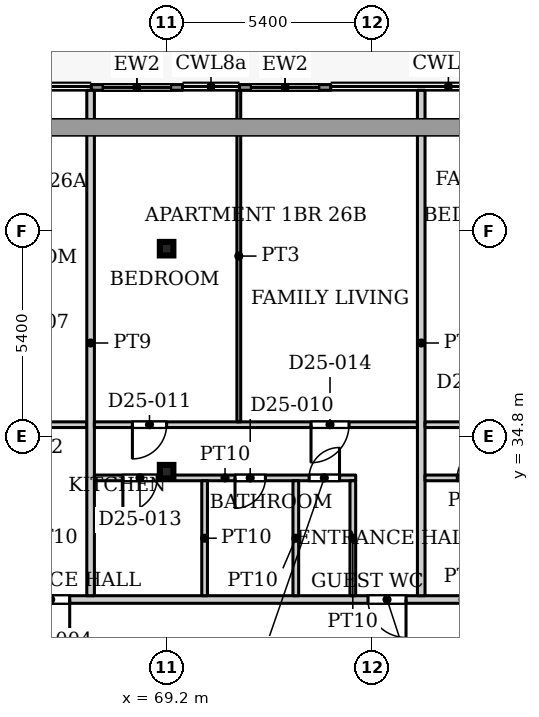
"""IFC4 building model, lengths in metres.
Left out: names, types, materials, properties, quantities, classifications, styles, units other than length and angle.
Written with IfcOpenShell. Run it as: python <this file> out.ifc"""

import sys

from ifc_helpers import new_model, si_unit, direction, frame, frame_2d, origin, origin_2d, place, context, subcontext, project, spatial, rectangle, hollow_rectangle, extrude, source, transform, mapped, element, fill, save


model = new_model("IFC4")
c1 = context("Model", 3, precision=1e-05, world=origin(), true_north=direction((0.0, 1.0)))
c2 = subcontext(c1, "Body", "Model", "MODEL_VIEW")
j1 = project(units=[si_unit("LENGTHUNIT", "METRE"), si_unit("PLANEANGLEUNIT", "RADIAN")], contexts=[c1])
p1 = place(None, origin())
s1 = spatial("IfcSite", under=j1, at=p1, CompositionType="ELEMENT")
p2 = place(p1, origin())
s2 = spatial("IfcBuilding", under=s1, at=p2, CompositionType="ELEMENT")
p3 = place(p2, frame((0.0, 0.0, 113.6)))
s3 = spatial("IfcBuildingStorey", under=s2, at=p3, CompositionType="ELEMENT", Elevation=113.6)
for number, where, z_axis, x_axis in (
    (1, (69.2, 33.863, 0.0), (0.0, 0.0, 1.0), (1.0, 0.0, 0.0)),
    (2, (69.2, 39.732, 0.0), (0.0, 0.0, 1.0), (1.0, 0.0, 0.0)),
):
    element("IfcColumn", number, at=place(p3, frame(where, z_axis=z_axis, x_axis=x_axis)), inside=s3, PredefinedType="COLUMN", context=c2, shape_type="SweptSolid", body=[
        extrude(hollow_rectangle(XDim=0.356, YDim=0.356, WallThickness=0.016, InnerFilletRadius=0.016, OuterFilletRadius=0.032, at=origin_2d()), origin(), (0.0, 0.0, 1.0), 3.9),
    ])
p4 = place(p3, frame((67.218, 43.975, 0.0), z_axis=(0.0, 0.0, 1.0), x_axis=(1.0, 0.0, 0.0)))
e3 = element("IfcWall", 3, at=p4, inside=s3, PredefinedType="SOLIDWALL", context=c2, shape_type="SweptSolid", body=[
    extrude(rectangle(XDim=2.4, YDim=0.15, at=frame_2d((1.2, 0.0))), origin(), (0.0, 0.0, 1.0), 3.75),
])
p5 = place(p4, frame((0.3, 0.0, 0.0)))
e4 = element("IfcOpeningElement", 4, at=p5, cuts=e3, PredefinedType="OPENING", context=c2, shape_type="SweptSolid", body=[
    extrude(rectangle(XDim=1.8, YDim=2.4, at=frame_2d((0.9, 1.2))), frame((0.0, 0.085, 0.0), z_axis=(0.0, -1.0, 0.0), x_axis=(1.0, 0.0, 0.0)), (0.0, 0.0, 1.0), 0.17),
])
p6 = place(p3, frame((71.118, 43.975, 0.0), z_axis=(0.0, 0.0, 1.0), x_axis=(1.0, 0.0, 0.0)))
e5 = element("IfcWall", 5, at=p6, inside=s3, PredefinedType="SOLIDWALL", context=c2, shape_type="SweptSolid", body=[
    extrude(rectangle(XDim=2.4, YDim=0.15, at=frame_2d((1.2, 0.0))), origin(), (0.0, 0.0, 1.0), 3.75),
])
p7 = place(p6, frame((0.3, 0.0, 0.0)))
e6 = element("IfcOpeningElement", 6, at=p7, cuts=e5, PredefinedType="OPENING", context=c2, shape_type="SweptSolid", body=[
    extrude(rectangle(XDim=1.8, YDim=2.4, at=frame_2d((0.9, 1.2))), frame((0.0, 0.085, 0.0), z_axis=(0.0, -1.0, 0.0), x_axis=(1.0, 0.0, 0.0)), (0.0, 0.0, 1.0), 0.17),
])
p8 = place(p3, frame((55.9, 30.5, 0.0), z_axis=(0.0, 0.0, 1.0), x_axis=(1.0, 0.0, 0.0)))
e7 = element("IfcWall", 7, at=p8, inside=s3, PredefinedType="PARTITIONING", context=c2, shape_type="SweptSolid", body=[
    extrude(rectangle(XDim=42.2, YDim=0.2, at=frame_2d((21.1, 0.0))), origin(), (0.0, 0.0, 1.0), 3.6),
])
p9 = place(p8, frame((9.75, 0.0, 0.0)))
e8 = element("IfcOpeningElement", 8, at=p9, cuts=e7, PredefinedType="OPENING", context=c2, shape_type="SweptSolid", body=[
    extrude(rectangle(XDim=1.0, YDim=2.1, at=frame_2d((0.5, 1.05))), frame((0.0, 0.11, 0.0), z_axis=(0.0, -1.0, 0.0), x_axis=(1.0, 0.0, 0.0)), (0.0, 0.0, 1.0), 0.22),
])
p10 = place(p8, frame((18.6, 0.0, 0.0)))
e9 = element("IfcOpeningElement", 9, at=p10, cuts=e7, PredefinedType="OPENING", context=c2, shape_type="SweptSolid", body=[
    extrude(rectangle(XDim=1.0, YDim=2.1, at=frame_2d((0.5, 1.05))), frame((0.0, 0.11, 0.0), z_axis=(0.0, -1.0, 0.0), x_axis=(1.0, 0.0, 0.0)), (0.0, 0.0, 1.0), 0.22),
])
p11 = place(p8, frame((23.4, 0.0, 0.0)))
e10 = element("IfcOpeningElement", 10, at=p11, cuts=e7, PredefinedType="OPENING", context=c2, shape_type="SweptSolid", body=[
    extrude(rectangle(XDim=1.0, YDim=2.1, at=frame_2d((0.5, 1.05))), frame((0.0, 0.11, 0.0), z_axis=(0.0, -1.0, 0.0), x_axis=(1.0, 0.0, 0.0)), (0.0, 0.0, 1.0), 0.22),
])
p12 = place(p8, frame((40.2, 0.0, 0.0)))
e11 = element("IfcOpeningElement", 11, at=p12, cuts=e7, PredefinedType="OPENING", context=c2, shape_type="SweptSolid", body=[
    extrude(rectangle(XDim=1.0, YDim=2.1, at=frame_2d((0.5, 1.05))), frame((0.0, 0.11, 0.0), z_axis=(0.0, -1.0, 0.0), x_axis=(1.0, 0.0, 0.0)), (0.0, 0.0, 1.0), 0.22),
])
p13 = place(p3, frame((55.9, 35.1, 0.0), z_axis=(0.0, 0.0, 1.0), x_axis=(1.0, 0.0, 0.0)))
e12 = element("IfcWall", 12, at=p13, inside=s3, PredefinedType="PARTITIONING", context=c2, shape_type="SweptSolid", body=[
    extrude(rectangle(XDim=11.2, YDim=0.15, at=frame_2d((5.6, 0.0))), origin(), (0.0, 0.0, 1.0), 3.6),
])
p14 = place(p13, frame((9.05, 0.0, 0.0)))
e13 = element("IfcOpeningElement", 13, at=p14, cuts=e12, PredefinedType="OPENING", context=c2, shape_type="SweptSolid", body=[
    extrude(rectangle(XDim=0.9, YDim=2.1, at=frame_2d((0.45, 1.05))), frame((0.0, 0.085, 0.0), z_axis=(0.0, -1.0, 0.0), x_axis=(1.0, 0.0, 0.0)), (0.0, 0.0, 1.0), 0.17),
])
p15 = place(p13, frame((1.5, 0.0, 0.0)))
e14 = element("IfcOpeningElement", 14, at=p15, cuts=e12, PredefinedType="OPENING", context=c2, shape_type="SweptSolid", body=[
    extrude(rectangle(XDim=1.0, YDim=2.1, at=frame_2d((0.5, 1.05))), frame((0.0, 0.085, 0.0), z_axis=(0.0, -1.0, 0.0), x_axis=(1.0, 0.0, 0.0)), (0.0, 0.0, 1.0), 0.17),
])
p16 = place(p13, frame((6.5, 0.0, 0.0)))
e15 = element("IfcOpeningElement", 15, at=p16, cuts=e12, PredefinedType="OPENING", context=c2, shape_type="SweptSolid", body=[
    extrude(rectangle(XDim=0.9, YDim=2.1, at=frame_2d((0.45, 1.05))), frame((0.0, 0.085, 0.0), z_axis=(0.0, -1.0, 0.0), x_axis=(1.0, 0.0, 0.0)), (0.0, 0.0, 1.0), 0.17),
])
p17 = place(p3, frame((67.2, 30.6, 0.0), z_axis=(0.0, 0.0, 1.0), x_axis=(0.0, 1.0, 0.0)))
e16 = element("IfcWall", 16, at=p17, inside=s3, PredefinedType="PARTITIONING", context=c2, shape_type="SweptSolid", body=[
    extrude(rectangle(XDim=13.3, YDim=0.2, at=frame_2d((6.65, 0.0))), origin(), (0.0, 0.0, 1.0), 3.6),
])
p18 = place(p3, frame((67.3, 33.7, 0.0), z_axis=(0.0, 0.0, 1.0), x_axis=(1.0, 0.0, 0.0)))
e17 = element("IfcWall", 17, at=p18, inside=s3, PredefinedType="PARTITIONING", context=c2, shape_type="SweptSolid", body=[
    extrude(rectangle(XDim=6.875, YDim=0.15, at=frame_2d((3.438, 0.0))), origin(), (0.0, 0.0, 1.0), 3.6),
])
p19 = place(p18, frame((3.7, 0.0, 0.0)))
e18 = element("IfcOpeningElement", 18, at=p19, cuts=e17, PredefinedType="OPENING", context=c2, shape_type="SweptSolid", body=[
    extrude(rectangle(XDim=0.8, YDim=2.1, at=frame_2d((0.4, 1.05))), frame((0.0, 0.085, 0.0), z_axis=(0.0, -1.0, 0.0), x_axis=(1.0, 0.0, 0.0)), (0.0, 0.0, 1.0), 0.17),
])
p20 = place(p18, frame((0.75, 0.0, 0.0)))
e19 = element("IfcOpeningElement", 19, at=p20, cuts=e17, PredefinedType="OPENING", context=c2, shape_type="SweptSolid", body=[
    extrude(rectangle(XDim=0.9, YDim=2.1, at=frame_2d((0.45, 1.05))), frame((0.0, 0.085, 0.0), z_axis=(0.0, -1.0, 0.0), x_axis=(1.0, 0.0, 0.0)), (0.0, 0.0, 1.0), 0.17),
])
p21 = place(p18, frame((5.65, 0.0, 0.0)))
e20 = element("IfcOpeningElement", 20, at=p21, cuts=e17, PredefinedType="OPENING", context=c2, shape_type="SweptSolid", body=[
    extrude(rectangle(XDim=0.8, YDim=2.1, at=frame_2d((0.4, 1.05))), frame((0.0, 0.085, 0.0), z_axis=(0.0, -1.0, 0.0), x_axis=(1.0, 0.0, 0.0)), (0.0, 0.0, 1.0), 0.17),
])
p22 = place(p3, frame((67.3, 35.1, 0.0), z_axis=(0.0, 0.0, 1.0), x_axis=(1.0, 0.0, 0.0)))
e21 = element("IfcWall", 21, at=p22, inside=s3, PredefinedType="PARTITIONING", context=c2, shape_type="SweptSolid", body=[
    extrude(rectangle(XDim=8.5, YDim=0.15, at=frame_2d((4.25, 0.0))), origin(), (0.0, 0.0, 1.0), 3.6),
])
p23 = place(p22, frame((1.0, 0.0, 0.0)))
e22 = element("IfcOpeningElement", 22, at=p23, cuts=e21, PredefinedType="OPENING", context=c2, shape_type="SweptSolid", body=[
    extrude(rectangle(XDim=0.9, YDim=2.1, at=frame_2d((0.45, 1.05))), frame((0.0, 0.085, 0.0), z_axis=(0.0, -1.0, 0.0), x_axis=(1.0, 0.0, 0.0)), (0.0, 0.0, 1.0), 0.17),
])
p24 = place(p22, frame((5.7, 0.0, 0.0)))
e23 = element("IfcOpeningElement", 23, at=p24, cuts=e21, PredefinedType="OPENING", context=c2, shape_type="SweptSolid", body=[
    extrude(rectangle(XDim=1.0, YDim=2.1, at=frame_2d((0.5, 1.05))), frame((0.0, 0.085, 0.0), z_axis=(0.0, -1.0, 0.0), x_axis=(1.0, 0.0, 0.0)), (0.0, 0.0, 1.0), 0.17),
])
p25 = place(p3, frame((70.2, 30.6, 0.0), z_axis=(0.0, 0.0, 1.0), x_axis=(0.0, 1.0, 0.0)))
e24 = element("IfcWall", 24, at=p25, inside=s3, PredefinedType="PARTITIONING", context=c2, shape_type="SweptSolid", body=[
    extrude(rectangle(XDim=3.025, YDim=0.15, at=frame_2d((1.512, 0.0))), origin(), (0.0, 0.0, 1.0), 3.6),
])
p26 = place(p3, frame((71.1, 35.175, 0.0), z_axis=(0.0, 0.0, 1.0), x_axis=(0.0, 1.0, 0.0)))
e25 = element("IfcWall", 25, at=p26, inside=s3, PredefinedType="PARTITIONING", context=c2, shape_type="SweptSolid", body=[
    extrude(rectangle(XDim=8.725, YDim=0.1, at=frame_2d((4.362, 0.0))), origin(), (0.0, 0.0, 1.0), 3.6),
])
for number, where, z_axis, x_axis in (
    (26, (72.6, 30.6, 0.0), (0.0, 0.0, 1.0), (0.0, 1.0, 0.0)),
    (27, (74.1, 30.6, 0.0), (0.0, 0.0, 1.0), (0.0, 1.0, 0.0)),
):
    element("IfcWall", number, at=place(p3, frame(where, z_axis=z_axis, x_axis=x_axis)), inside=s3, PredefinedType="PARTITIONING", context=c2, shape_type="SweptSolid", body=[
        extrude(rectangle(XDim=3.025, YDim=0.15, at=frame_2d((1.512, 0.0))), origin(), (0.0, 0.0, 1.0), 3.6),
    ])
p27 = place(p3, frame((75.9, 30.6, 0.0), z_axis=(0.0, 0.0, 1.0), x_axis=(0.0, 1.0, 0.0)))
e28 = element("IfcWall", 28, at=p27, inside=s3, PredefinedType="PARTITIONING", context=c2, shape_type="SweptSolid", body=[
    extrude(rectangle(XDim=13.3, YDim=0.2, at=frame_2d((6.65, 0.0))), origin(), (0.0, 0.0, 1.0), 3.6),
])
p28 = place(p3, frame((76.0, 33.7, 0.0), z_axis=(0.0, 0.0, 1.0), x_axis=(1.0, 0.0, 0.0)))
e29 = element("IfcWall", 29, at=p28, inside=s3, PredefinedType="PARTITIONING", context=c2, shape_type="SweptSolid", body=[
    extrude(rectangle(XDim=2.525, YDim=0.15, at=frame_2d((1.262, 0.0))), origin(), (0.0, 0.0, 1.0), 3.6),
])
p29 = place(p28, frame((0.85, 0.0, 0.0)))
e30 = element("IfcOpeningElement", 30, at=p29, cuts=e29, PredefinedType="OPENING", context=c2, shape_type="SweptSolid", body=[
    extrude(rectangle(XDim=0.8, YDim=2.1, at=frame_2d((0.4, 1.05))), frame((0.0, 0.085, 0.0), z_axis=(0.0, -1.0, 0.0), x_axis=(1.0, 0.0, 0.0)), (0.0, 0.0, 1.0), 0.17),
])
p30 = place(p3, frame((76.0, 35.1, 0.0), z_axis=(0.0, 0.0, 1.0), x_axis=(1.0, 0.0, 0.0)))
e31 = element("IfcWall", 31, at=p30, inside=s3, PredefinedType="PARTITIONING", context=c2, shape_type="SweptSolid", body=[
    extrude(rectangle(XDim=14.5, YDim=0.15, at=frame_2d((7.25, 0.0))), origin(), (0.0, 0.0, 1.0), 3.6),
])
p31 = place(p30, frame((0.95, 0.0, 0.0)))
e32 = element("IfcOpeningElement", 32, at=p31, cuts=e31, PredefinedType="OPENING", context=c2, shape_type="SweptSolid", body=[
    extrude(rectangle(XDim=0.9, YDim=2.1, at=frame_2d((0.45, 1.05))), frame((0.0, 0.085, 0.0), z_axis=(0.0, -1.0, 0.0), x_axis=(1.0, 0.0, 0.0)), (0.0, 0.0, 1.0), 0.17),
])
p32 = place(p30, frame((6.65, 0.0, 0.0)))
e33 = element("IfcOpeningElement", 33, at=p32, cuts=e31, PredefinedType="OPENING", context=c2, shape_type="SweptSolid", body=[
    extrude(rectangle(XDim=0.9, YDim=2.1, at=frame_2d((0.45, 1.05))), frame((0.0, 0.085, 0.0), z_axis=(0.0, -1.0, 0.0), x_axis=(1.0, 0.0, 0.0)), (0.0, 0.0, 1.0), 0.17),
])
p33 = place(p30, frame((3.9, 0.0, 0.0)))
e34 = element("IfcOpeningElement", 34, at=p33, cuts=e31, PredefinedType="OPENING", context=c2, shape_type="SweptSolid", body=[
    extrude(rectangle(XDim=1.0, YDim=2.1, at=frame_2d((0.5, 1.05))), frame((0.0, 0.085, 0.0), z_axis=(0.0, -1.0, 0.0), x_axis=(1.0, 0.0, 0.0)), (0.0, 0.0, 1.0), 0.17),
])
p34 = place(p30, frame((9.45, 0.0, 0.0)))
e35 = element("IfcOpeningElement", 35, at=p34, cuts=e31, PredefinedType="OPENING", context=c2, shape_type="SweptSolid", body=[
    extrude(rectangle(XDim=0.9, YDim=2.1, at=frame_2d((0.45, 1.05))), frame((0.0, 0.085, 0.0), z_axis=(0.0, -1.0, 0.0), x_axis=(1.0, 0.0, 0.0)), (0.0, 0.0, 1.0), 0.17),
])
p35 = place(p30, frame((13.25, 0.0, 0.0)))
e36 = element("IfcOpeningElement", 36, at=p35, cuts=e31, PredefinedType="OPENING", context=c2, shape_type="SweptSolid", body=[
    extrude(rectangle(XDim=0.9, YDim=2.1, at=frame_2d((0.45, 1.05))), frame((0.0, 0.085, 0.0), z_axis=(0.0, -1.0, 0.0), x_axis=(1.0, 0.0, 0.0)), (0.0, 0.0, 1.0), 0.17),
])
m1 = source(origin(), c2, "Body", "SweptSolid", [
    extrude(rectangle(XDim=1.8, YDim=2.4, at=frame_2d((0.9, 1.2))), frame((0.0, 0.025, 0.0), z_axis=(0.0, -1.0, 0.0), x_axis=(1.0, 0.0, 0.0)), (0.0, 0.0, 1.0), 0.05),
])
p36 = place(p5, origin())
e37 = element("IfcDoor", 37, at=p36, inside=s3, OperationType="SLIDING_TO_LEFT", PredefinedType="DOOR", context=c2, shape_type="MappedRepresentation", body=[
    mapped(m1, transform((0.0, 0.0, 0.0), x_axis=(1.0, 0.0, 0.0), y_axis=(0.0, 1.0, 0.0), z_axis=(0.0, 0.0, 1.0), scale=1.0)),
])
fill(e4, e37)
p37 = place(p7, origin())
e38 = element("IfcDoor", 38, at=p37, inside=s3, OperationType="SLIDING_TO_LEFT", PredefinedType="DOOR", context=c2, shape_type="MappedRepresentation", body=[
    mapped(m1, transform((0.0, 0.0, 0.0), x_axis=(1.0, 0.0, 0.0), y_axis=(0.0, 1.0, 0.0), z_axis=(0.0, 0.0, 1.0), scale=1.0)),
])
fill(e6, e38)
m2 = source(origin(), c2, "Body", "SweptSolid", [
    extrude(rectangle(XDim=1.0, YDim=2.1, at=frame_2d((0.5, 1.05))), frame((0.0, 0.025, 0.0), z_axis=(0.0, -1.0, 0.0), x_axis=(1.0, 0.0, 0.0)), (0.0, 0.0, 1.0), 0.05),
])
p38 = place(p9, origin())
e39 = element("IfcDoor", 39, at=p38, inside=s3, OperationType="SINGLE_SWING_RIGHT", PredefinedType="DOOR", context=c2, shape_type="MappedRepresentation", body=[
    mapped(m2, transform((0.0, 0.0, 0.0), x_axis=(1.0, 0.0, 0.0), y_axis=(0.0, 1.0, 0.0), z_axis=(0.0, 0.0, 1.0), scale=1.0)),
])
fill(e8, e39)
m3 = source(origin(), c2, "Body", "SweptSolid", [
    extrude(rectangle(XDim=0.8, YDim=2.1, at=frame_2d((0.4, 1.05))), frame((0.0, 0.025, 0.0), z_axis=(0.0, -1.0, 0.0), x_axis=(1.0, 0.0, 0.0)), (0.0, 0.0, 1.0), 0.05),
])
p39 = place(p19, origin())
e40 = element("IfcDoor", 40, at=p39, inside=s3, OperationType="SINGLE_SWING_RIGHT", PredefinedType="DOOR", context=c2, shape_type="MappedRepresentation", body=[
    mapped(m3, transform((0.0, 0.0, 0.0), x_axis=(1.0, 0.0, 0.0), y_axis=(0.0, 1.0, 0.0), z_axis=(0.0, 0.0, 1.0), scale=1.0)),
])
fill(e18, e40)
m4 = source(origin(), c2, "Body", "SweptSolid", [
    extrude(rectangle(XDim=0.9, YDim=2.1, at=frame_2d((0.45, 1.05))), frame((0.0, 0.025, 0.0), z_axis=(0.0, -1.0, 0.0), x_axis=(1.0, 0.0, 0.0)), (0.0, 0.0, 1.0), 0.05),
])
p40 = place(p23, origin())
e41 = element("IfcDoor", 41, at=p40, inside=s3, OperationType="SINGLE_SWING_RIGHT", PredefinedType="DOOR", context=c2, shape_type="MappedRepresentation", body=[
    mapped(m4, transform((0.0, 0.0, 0.0), x_axis=(1.0, 0.0, 0.0), y_axis=(0.0, 1.0, 0.0), z_axis=(0.0, 0.0, 1.0), scale=1.0)),
])
fill(e22, e41)
p41 = place(p10, origin())
e42 = element("IfcDoor", 42, at=p41, inside=s3, OperationType="SINGLE_SWING_RIGHT", PredefinedType="DOOR", context=c2, shape_type="MappedRepresentation", body=[
    mapped(m2, transform((0.0, 0.0, 0.0), x_axis=(1.0, 0.0, 0.0), y_axis=(0.0, 1.0, 0.0), z_axis=(0.0, 0.0, 1.0), scale=1.0)),
])
fill(e9, e42)
p42 = place(p20, origin())
e43 = element("IfcDoor", 43, at=p42, inside=s3, OperationType="SINGLE_SWING_RIGHT", PredefinedType="DOOR", context=c2, shape_type="MappedRepresentation", body=[
    mapped(m4, transform((0.0, 0.0, 0.0), x_axis=(1.0, 0.0, 0.0), y_axis=(0.0, 1.0, 0.0), z_axis=(0.0, 0.0, 1.0), scale=1.0)),
])
fill(e19, e43)
m5 = source(origin(), c2, "Body", "SweptSolid", [
    extrude(rectangle(XDim=1.0, YDim=2.1, at=frame_2d((0.5, 1.05))), frame((0.0, 0.025, 0.0), z_axis=(0.0, -1.0, 0.0), x_axis=(1.0, 0.0, 0.0)), (0.0, 0.0, 1.0), 0.05),
])
p43 = place(p24, origin())
e44 = element("IfcDoor", 44, at=p43, inside=s3, OperationType="SINGLE_SWING_RIGHT", PredefinedType="DOOR", context=c2, shape_type="MappedRepresentation", body=[
    mapped(m5, transform((0.0, 0.0, 0.0), x_axis=(1.0, 0.0, 0.0), y_axis=(0.0, 1.0, 0.0), z_axis=(0.0, 0.0, 1.0), scale=1.0)),
])
fill(e23, e44)
p44 = place(p21, origin())
e45 = element("IfcDoor", 45, at=p44, inside=s3, OperationType="SINGLE_SWING_LEFT", PredefinedType="DOOR", context=c2, shape_type="MappedRepresentation", body=[
    mapped(m3, transform((0.0, 0.0, 0.0), x_axis=(1.0, 0.0, 0.0), y_axis=(0.0, 1.0, 0.0), z_axis=(0.0, 0.0, 1.0), scale=1.0)),
])
fill(e20, e45)
p45 = place(p29, origin())
e46 = element("IfcDoor", 46, at=p45, inside=s3, OperationType="SINGLE_SWING_LEFT", PredefinedType="DOOR", context=c2, shape_type="MappedRepresentation", body=[
    mapped(m3, transform((0.0, 0.0, 0.0), x_axis=(1.0, 0.0, 0.0), y_axis=(0.0, 1.0, 0.0), z_axis=(0.0, 0.0, 1.0), scale=1.0)),
])
fill(e30, e46)
save(model, sys.argv[1])
